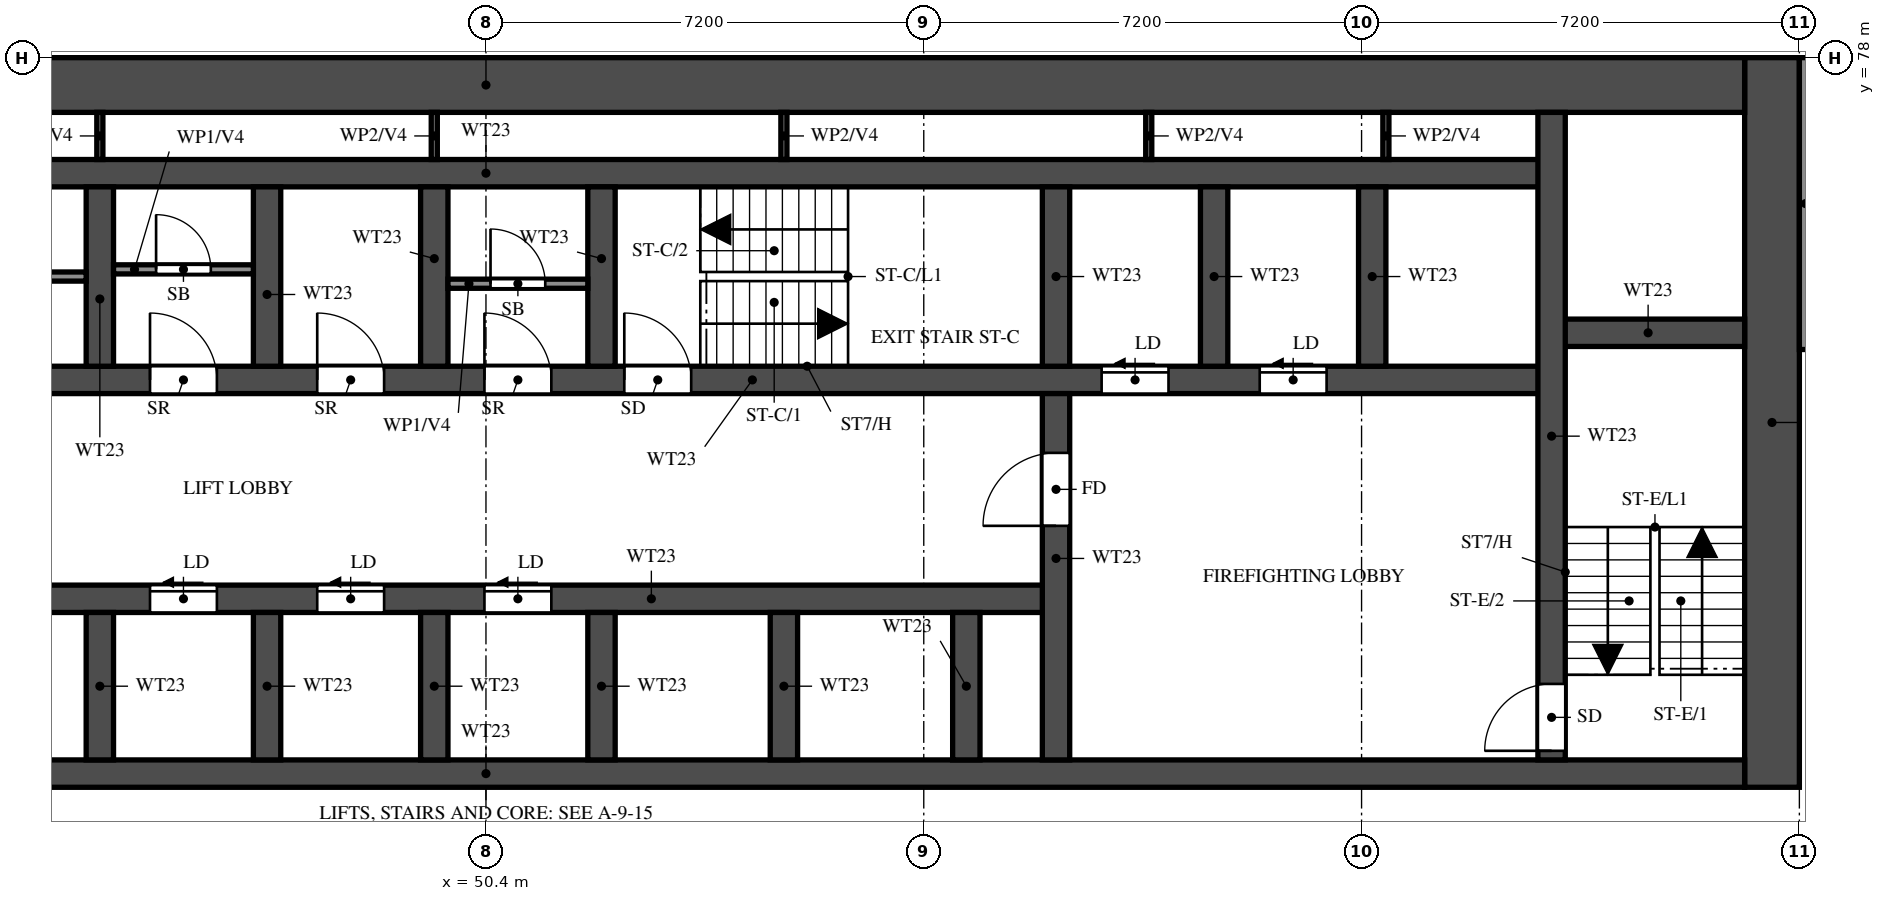
"""IFC4 building model, lengths in metres.
Left out: names, types, materials, properties, quantities, classifications, styles, units other than length and angle.
Written with IfcOpenShell. Run it as: python <this file> out.ifc"""

import sys

from ifc_helpers import new_model, si_unit, direction, frame, frame_2d, origin, place, context, subcontext, project, spatial, rectangle, extrude, element, fill, save


model = new_model("IFC4")
c1 = context("Model", 3, precision=1e-05, world=origin(), true_north=direction((0.0, 1.0)))
c2 = subcontext(c1, "Body", "Model", "MODEL_VIEW")
j1 = project(units=[si_unit("LENGTHUNIT", "METRE"), si_unit("PLANEANGLEUNIT", "RADIAN")], contexts=[c1])
p1 = place(None, origin())
s1 = spatial("IfcSite", under=j1, at=p1, CompositionType="ELEMENT")
p2 = place(p1, origin())
s2 = spatial("IfcBuilding", under=s1, at=p2, CompositionType="ELEMENT")
p3 = place(p2, frame((0.0, 0.0, 104.0)))
s3 = spatial("IfcBuildingStorey", under=s2, at=p3, CompositionType="ELEMENT", Elevation=104.0)
p4 = place(p3, frame((71.55, 66.0, 0.0), z_axis=(0.0, 0.0, 1.0), x_axis=(0.0, 1.0, 0.0)))
e1 = element("IfcWall", 1, at=p4, inside=s3, PredefinedType="SHEAR", context=c2, shape_type="SweptSolid", body=[
    extrude(rectangle(XDim=12.0, YDim=0.9, at=frame_2d((6.0, 0.0))), origin(), (0.0, 0.0, 1.0), 3.1),
])
p5 = place(p3, frame((29.7, 77.55, 0.0), z_axis=(0.0, 0.0, 1.0), x_axis=(1.0, 0.0, 0.0)))
e2 = element("IfcWall", 2, at=p5, inside=s3, PredefinedType="SHEAR", context=c2, shape_type="SweptSolid", body=[
    extrude(rectangle(XDim=41.4, YDim=0.9, at=frame_2d((20.7, 0.0))), origin(), (0.0, 0.0, 1.0), 3.1),
])
p6 = place(p3, frame((29.7, 66.225, 0.0), z_axis=(0.0, 0.0, 1.0), x_axis=(1.0, 0.0, 0.0)))
e3 = element("IfcWall", 3, at=p6, inside=s3, PredefinedType="SHEAR", context=c2, shape_type="SweptSolid", body=[
    extrude(rectangle(XDim=41.4, YDim=0.45, at=frame_2d((20.7, 0.0))), origin(), (0.0, 0.0, 1.0), 3.1),
])
p7 = place(p6, frame((0.925, 0.0, 0.0)))
e4 = element("IfcOpeningElement", 4, at=p7, cuts=e3, PredefinedType="OPENING", context=c2, shape_type="SweptSolid", body=[
    extrude(rectangle(XDim=1.1, YDim=2.1, at=frame_2d((0.55, 1.05))), frame((0.0, 0.235, 0.0), z_axis=(0.0, -1.0, 0.0), x_axis=(1.0, 0.0, 0.0)), (0.0, 0.0, 1.0), 0.47),
])
p8 = place(p6, frame((3.738, 0.0, 0.0)))
e5 = element("IfcOpeningElement", 5, at=p8, cuts=e3, PredefinedType="OPENING", context=c2, shape_type="SweptSolid", body=[
    extrude(rectangle(XDim=1.8, YDim=2.1, at=frame_2d((0.9, 1.05))), frame((0.0, 0.235, 0.0), z_axis=(0.0, -1.0, 0.0), x_axis=(1.0, 0.0, 0.0)), (0.0, 0.0, 1.0), 0.47),
])
p9 = place(p3, frame((35.575, 69.1, 0.0), z_axis=(0.0, 0.0, 1.0), x_axis=(1.0, 0.0, 0.0)))
e6 = element("IfcWall", 6, at=p9, inside=s3, PredefinedType="SHEAR", context=c2, shape_type="SweptSolid", body=[
    extrude(rectangle(XDim=24.2, YDim=0.45, at=frame_2d((12.1, 0.0))), origin(), (0.0, 0.0, 1.0), 3.1),
])
p10 = place(p9, frame((1.05, 0.0, 0.0)))
e7 = element("IfcOpeningElement", 7, at=p10, cuts=e6, PredefinedType="OPENING", context=c2, shape_type="SweptSolid", body=[
    extrude(rectangle(XDim=1.1, YDim=2.1, at=frame_2d((0.55, 1.05))), frame((0.0, 0.235, 0.0), z_axis=(0.0, -1.0, 0.0), x_axis=(1.0, 0.0, 0.0)), (0.0, 0.0, 1.0), 0.47),
])
p11 = place(p9, frame((3.8, 0.0, 0.0)))
e8 = element("IfcOpeningElement", 8, at=p11, cuts=e6, PredefinedType="OPENING", context=c2, shape_type="SweptSolid", body=[
    extrude(rectangle(XDim=1.1, YDim=2.1, at=frame_2d((0.55, 1.05))), frame((0.0, 0.235, 0.0), z_axis=(0.0, -1.0, 0.0), x_axis=(1.0, 0.0, 0.0)), (0.0, 0.0, 1.0), 0.47),
])
p12 = place(p9, frame((6.55, 0.0, 0.0)))
e9 = element("IfcOpeningElement", 9, at=p12, cuts=e6, PredefinedType="OPENING", context=c2, shape_type="SweptSolid", body=[
    extrude(rectangle(XDim=1.1, YDim=2.1, at=frame_2d((0.55, 1.05))), frame((0.0, 0.235, 0.0), z_axis=(0.0, -1.0, 0.0), x_axis=(1.0, 0.0, 0.0)), (0.0, 0.0, 1.0), 0.47),
])
p13 = place(p9, frame((9.3, 0.0, 0.0)))
e10 = element("IfcOpeningElement", 10, at=p13, cuts=e6, PredefinedType="OPENING", context=c2, shape_type="SweptSolid", body=[
    extrude(rectangle(XDim=1.1, YDim=2.1, at=frame_2d((0.55, 1.05))), frame((0.0, 0.235, 0.0), z_axis=(0.0, -1.0, 0.0), x_axis=(1.0, 0.0, 0.0)), (0.0, 0.0, 1.0), 0.47),
])
p14 = place(p9, frame((12.05, 0.0, 0.0)))
e11 = element("IfcOpeningElement", 11, at=p14, cuts=e6, PredefinedType="OPENING", context=c2, shape_type="SweptSolid", body=[
    extrude(rectangle(XDim=1.1, YDim=2.1, at=frame_2d((0.55, 1.05))), frame((0.0, 0.235, 0.0), z_axis=(0.0, -1.0, 0.0), x_axis=(1.0, 0.0, 0.0)), (0.0, 0.0, 1.0), 0.47),
])
p15 = place(p9, frame((14.8, 0.0, 0.0)))
e12 = element("IfcOpeningElement", 12, at=p15, cuts=e6, PredefinedType="OPENING", context=c2, shape_type="SweptSolid", body=[
    extrude(rectangle(XDim=1.1, YDim=2.1, at=frame_2d((0.55, 1.05))), frame((0.0, 0.235, 0.0), z_axis=(0.0, -1.0, 0.0), x_axis=(1.0, 0.0, 0.0)), (0.0, 0.0, 1.0), 0.47),
])
p16 = place(p3, frame((32.875, 72.7, 0.0), z_axis=(0.0, 0.0, 1.0), x_axis=(1.0, 0.0, 0.0)))
e13 = element("IfcWall", 13, at=p16, inside=s3, PredefinedType="SHEAR", context=c2, shape_type="SweptSolid", body=[
    extrude(rectangle(XDim=35.05, YDim=0.45, at=frame_2d((17.525, 0.0))), origin(), (0.0, 0.0, 1.0), 3.1),
])
p17 = place(p16, frame((19.8, 0.0, 0.0)))
e14 = element("IfcOpeningElement", 14, at=p17, cuts=e13, PredefinedType="OPENING", context=c2, shape_type="SweptSolid", body=[
    extrude(rectangle(XDim=1.1, YDim=2.1, at=frame_2d((0.55, 1.05))), frame((0.0, 0.235, 0.0), z_axis=(0.0, -1.0, 0.0), x_axis=(1.0, 0.0, 0.0)), (0.0, 0.0, 1.0), 0.47),
])
p18 = place(p16, frame((27.65, 0.0, 0.0)))
e15 = element("IfcOpeningElement", 15, at=p18, cuts=e13, PredefinedType="OPENING", context=c2, shape_type="SweptSolid", body=[
    extrude(rectangle(XDim=1.1, YDim=2.1, at=frame_2d((0.55, 1.05))), frame((0.0, 0.235, 0.0), z_axis=(0.0, -1.0, 0.0), x_axis=(1.0, 0.0, 0.0)), (0.0, 0.0, 1.0), 0.47),
])
p19 = place(p16, frame((30.25, 0.0, 0.0)))
e16 = element("IfcOpeningElement", 16, at=p19, cuts=e13, PredefinedType="OPENING", context=c2, shape_type="SweptSolid", body=[
    extrude(rectangle(XDim=1.1, YDim=2.1, at=frame_2d((0.55, 1.05))), frame((0.0, 0.235, 0.0), z_axis=(0.0, -1.0, 0.0), x_axis=(1.0, 0.0, 0.0)), (0.0, 0.0, 1.0), 0.47),
])
p20 = place(p16, frame((3.75, 0.0, 0.0)))
e17 = element("IfcOpeningElement", 17, at=p20, cuts=e13, PredefinedType="OPENING", context=c2, shape_type="SweptSolid", body=[
    extrude(rectangle(XDim=1.1, YDim=2.1, at=frame_2d((0.55, 1.05))), frame((0.0, 0.235, 0.0), z_axis=(0.0, -1.0, 0.0), x_axis=(1.0, 0.0, 0.0)), (0.0, 0.0, 1.0), 0.47),
])
p21 = place(p16, frame((6.5, 0.0, 0.0)))
e18 = element("IfcOpeningElement", 18, at=p21, cuts=e13, PredefinedType="OPENING", context=c2, shape_type="SweptSolid", body=[
    extrude(rectangle(XDim=1.1, YDim=2.1, at=frame_2d((0.55, 1.05))), frame((0.0, 0.235, 0.0), z_axis=(0.0, -1.0, 0.0), x_axis=(1.0, 0.0, 0.0)), (0.0, 0.0, 1.0), 0.47),
])
p22 = place(p16, frame((9.25, 0.0, 0.0)))
e19 = element("IfcOpeningElement", 19, at=p22, cuts=e13, PredefinedType="OPENING", context=c2, shape_type="SweptSolid", body=[
    extrude(rectangle(XDim=1.1, YDim=2.1, at=frame_2d((0.55, 1.05))), frame((0.0, 0.235, 0.0), z_axis=(0.0, -1.0, 0.0), x_axis=(1.0, 0.0, 0.0)), (0.0, 0.0, 1.0), 0.47),
])
p23 = place(p16, frame((12.0, 0.0, 0.0)))
e20 = element("IfcOpeningElement", 20, at=p23, cuts=e13, PredefinedType="OPENING", context=c2, shape_type="SweptSolid", body=[
    extrude(rectangle(XDim=1.1, YDim=2.1, at=frame_2d((0.55, 1.05))), frame((0.0, 0.235, 0.0), z_axis=(0.0, -1.0, 0.0), x_axis=(1.0, 0.0, 0.0)), (0.0, 0.0, 1.0), 0.47),
])
p24 = place(p16, frame((14.75, 0.0, 0.0)))
e21 = element("IfcOpeningElement", 21, at=p24, cuts=e13, PredefinedType="OPENING", context=c2, shape_type="SweptSolid", body=[
    extrude(rectangle(XDim=1.1, YDim=2.1, at=frame_2d((0.55, 1.05))), frame((0.0, 0.235, 0.0), z_axis=(0.0, -1.0, 0.0), x_axis=(1.0, 0.0, 0.0)), (0.0, 0.0, 1.0), 0.47),
])
p25 = place(p16, frame((17.5, 0.0, 0.0)))
e22 = element("IfcOpeningElement", 22, at=p25, cuts=e13, PredefinedType="OPENING", context=c2, shape_type="SweptSolid", body=[
    extrude(rectangle(XDim=1.1, YDim=2.1, at=frame_2d((0.55, 1.05))), frame((0.0, 0.235, 0.0), z_axis=(0.0, -1.0, 0.0), x_axis=(1.0, 0.0, 0.0)), (0.0, 0.0, 1.0), 0.47),
])
p26 = place(p16, frame((0.913, 0.0, 0.0)))
e23 = element("IfcOpeningElement", 23, at=p26, cuts=e13, PredefinedType="OPENING", context=c2, shape_type="SweptSolid", body=[
    extrude(rectangle(XDim=1.1, YDim=2.1, at=frame_2d((0.55, 1.05))), frame((0.0, 0.235, 0.0), z_axis=(0.0, -1.0, 0.0), x_axis=(1.0, 0.0, 0.0)), (0.0, 0.0, 1.0), 0.47),
])
p27 = place(p3, frame((32.875, 76.1, 0.0), z_axis=(0.0, 0.0, 1.0), x_axis=(1.0, 0.0, 0.0)))
e24 = element("IfcWall", 24, at=p27, inside=s3, PredefinedType="SHEAR", context=c2, shape_type="SweptSolid", body=[
    extrude(rectangle(XDim=35.05, YDim=0.45, at=frame_2d((17.525, 0.0))), origin(), (0.0, 0.0, 1.0), 3.1),
])
p28 = place(p3, frame((67.925, 73.475, 0.0), z_axis=(0.0, 0.0, 1.0), x_axis=(1.0, 0.0, 0.0)))
e25 = element("IfcWall", 25, at=p28, inside=s3, PredefinedType="SHEAR", context=c2, shape_type="SweptSolid", body=[
    extrude(rectangle(XDim=3.175, YDim=0.45, at=frame_2d((1.587, 0.0))), origin(), (0.0, 0.0, 1.0), 3.1),
])
p29 = place(p3, frame((67.925, 66.45, 0.0), z_axis=(0.0, 0.0, 1.0), x_axis=(0.0, 1.0, 0.0)))
e26 = element("IfcWall", 26, at=p29, inside=s3, PredefinedType="SHEAR", context=c2, shape_type="SweptSolid", body=[
    extrude(rectangle(XDim=10.65, YDim=0.45, at=frame_2d((5.325, 0.0))), origin(), (0.0, 0.0, 1.0), 3.1),
])
p30 = place(p29, frame((0.15, 0.0, 0.0)))
e27 = element("IfcOpeningElement", 27, at=p30, cuts=e26, PredefinedType="OPENING", context=c2, shape_type="SweptSolid", body=[
    extrude(rectangle(XDim=1.1, YDim=2.1, at=frame_2d((0.55, 1.05))), frame((0.0, 0.235, 0.0), z_axis=(0.0, -1.0, 0.0), x_axis=(1.0, 0.0, 0.0)), (0.0, 0.0, 1.0), 0.47),
])
p31 = place(p3, frame((59.775, 66.45, 0.0), z_axis=(0.0, 0.0, 1.0), x_axis=(0.0, 1.0, 0.0)))
e28 = element("IfcWall", 28, at=p31, inside=s3, PredefinedType="SHEAR", context=c2, shape_type="SweptSolid", body=[
    extrude(rectangle(XDim=6.025, YDim=0.45, at=frame_2d((3.013, 0.0))), origin(), (0.0, 0.0, 1.0), 3.1),
])
p32 = place(p31, frame((3.85, 0.0, 0.0)))
e29 = element("IfcOpeningElement", 29, at=p32, cuts=e28, PredefinedType="OPENING", context=c2, shape_type="SweptSolid", body=[
    extrude(rectangle(XDim=1.2, YDim=2.1, at=frame_2d((0.6, 1.05))), frame((0.0, 0.235, 0.0), z_axis=(0.0, -1.0, 0.0), x_axis=(1.0, 0.0, 0.0)), (0.0, 0.0, 1.0), 0.47),
])
p33 = place(p3, frame((59.775, 72.925, 0.0), z_axis=(0.0, 0.0, 1.0), x_axis=(0.0, 1.0, 0.0)))
e30 = element("IfcWall", 30, at=p33, inside=s3, PredefinedType="SHEAR", context=c2, shape_type="SweptSolid", body=[
    extrude(rectangle(XDim=2.95, YDim=0.45, at=frame_2d((1.475, 0.0))), origin(), (0.0, 0.0, 1.0), 3.1),
])
for number, where, z_axis, x_axis in (
    (31, (44.05, 66.45, 0.0), (0.0, 0.0, 1.0), (0.0, 1.0, 0.0)),
    (32, (46.8, 66.45, 0.0), (0.0, 0.0, 1.0), (0.0, 1.0, 0.0)),
    (33, (49.55, 66.45, 0.0), (0.0, 0.0, 1.0), (0.0, 1.0, 0.0)),
    (34, (52.3, 66.45, 0.0), (0.0, 0.0, 1.0), (0.0, 1.0, 0.0)),
    (35, (55.3, 66.45, 0.0), (0.0, 0.0, 1.0), (0.0, 1.0, 0.0)),
    (36, (58.3, 66.45, 0.0), (0.0, 0.0, 1.0), (0.0, 1.0, 0.0)),
):
    element("IfcWall", number, at=place(p3, frame(where, z_axis=z_axis, x_axis=x_axis)), inside=s3, PredefinedType="SHEAR", context=c2, shape_type="SweptSolid", body=[
        extrude(rectangle(XDim=2.425, YDim=0.45, at=frame_2d((1.212, 0.0))), origin(), (0.0, 0.0, 1.0), 3.1),
    ])
for number, where, z_axis, x_axis in (
    (37, (44.05, 72.925, 0.0), (0.0, 0.0, 1.0), (0.0, 1.0, 0.0)),
    (38, (46.8, 72.925, 0.0), (0.0, 0.0, 1.0), (0.0, 1.0, 0.0)),
    (39, (49.55, 72.925, 0.0), (0.0, 0.0, 1.0), (0.0, 1.0, 0.0)),
    (40, (52.3, 72.925, 0.0), (0.0, 0.0, 1.0), (0.0, 1.0, 0.0)),
    (41, (62.375, 72.925, 0.0), (0.0, 0.0, 1.0), (0.0, 1.0, 0.0)),
    (42, (64.975, 72.925, 0.0), (0.0, 0.0, 1.0), (0.0, 1.0, 0.0)),
):
    element("IfcWall", number, at=place(p3, frame(where, z_axis=z_axis, x_axis=x_axis)), inside=s3, PredefinedType="SHEAR", context=c2, shape_type="SweptSolid", body=[
        extrude(rectangle(XDim=2.95, YDim=0.45, at=frame_2d((1.475, 0.0))), origin(), (0.0, 0.0, 1.0), 3.1),
    ])
p34 = place(p3, frame((41.525, 74.4, 0.0), z_axis=(0.0, 0.0, 1.0), x_axis=(1.0, 0.0, 0.0)))
e43 = element("IfcWall", 43, at=p34, inside=s3, PredefinedType="PARTITIONING", context=c2, shape_type="SweptSolid", body=[
    extrude(rectangle(XDim=2.3, YDim=0.15, at=frame_2d((1.15, 0.0))), origin(), (0.0, 0.0, 1.0), 3.1),
])
p35 = place(p34, frame((0.7, 0.0, 0.0)))
e44 = element("IfcOpeningElement", 44, at=p35, cuts=e43, PredefinedType="OPENING", context=c2, shape_type="SweptSolid", body=[
    extrude(rectangle(XDim=0.9, YDim=2.1, at=frame_2d((0.45, 1.05))), frame((0.0, 0.085, 0.0), z_axis=(0.0, -1.0, 0.0), x_axis=(1.0, 0.0, 0.0)), (0.0, 0.0, 1.0), 0.17),
])
p36 = place(p3, frame((44.275, 74.518, 0.0), z_axis=(0.0, 0.0, 1.0), x_axis=(1.0, 0.0, 0.0)))
e45 = element("IfcWall", 45, at=p36, inside=s3, PredefinedType="PARTITIONING", context=c2, shape_type="SweptSolid", body=[
    extrude(rectangle(XDim=2.3, YDim=0.15, at=frame_2d((1.15, 0.0))), origin(), (0.0, 0.0, 1.0), 3.1),
])
p37 = place(p36, frame((0.7, 0.0, 0.0)))
e46 = element("IfcOpeningElement", 46, at=p37, cuts=e45, PredefinedType="OPENING", context=c2, shape_type="SweptSolid", body=[
    extrude(rectangle(XDim=0.9, YDim=2.1, at=frame_2d((0.45, 1.05))), frame((0.0, 0.085, 0.0), z_axis=(0.0, -1.0, 0.0), x_axis=(1.0, 0.0, 0.0)), (0.0, 0.0, 1.0), 0.17),
])
p38 = place(p3, frame((49.775, 74.282, 0.0), z_axis=(0.0, 0.0, 1.0), x_axis=(1.0, 0.0, 0.0)))
e47 = element("IfcWall", 47, at=p38, inside=s3, PredefinedType="PARTITIONING", context=c2, shape_type="SweptSolid", body=[
    extrude(rectangle(XDim=2.3, YDim=0.15, at=frame_2d((1.15, 0.0))), origin(), (0.0, 0.0, 1.0), 3.1),
])
p39 = place(p38, frame((0.7, 0.0, 0.0)))
e48 = element("IfcOpeningElement", 48, at=p39, cuts=e47, PredefinedType="OPENING", context=c2, shape_type="SweptSolid", body=[
    extrude(rectangle(XDim=0.9, YDim=2.1, at=frame_2d((0.45, 1.05))), frame((0.0, 0.085, 0.0), z_axis=(0.0, -1.0, 0.0), x_axis=(1.0, 0.0, 0.0)), (0.0, 0.0, 1.0), 0.17),
])
for number, where, z_axis, x_axis in (
    (49, (44.05, 76.325, 0.0), (0.0, 0.0, 1.0), (0.0, 1.0, 0.0)),
    (50, (49.55, 76.325, 0.0), (0.0, 0.0, 1.0), (0.0, 1.0, 0.0)),
    (51, (55.3, 76.325, 0.0), (0.0, 0.0, 1.0), (0.0, 1.0, 0.0)),
    (52, (61.3, 76.325, 0.0), (0.0, 0.0, 1.0), (0.0, 1.0, 0.0)),
    (53, (65.2, 76.325, 0.0), (0.0, 0.0, 1.0), (0.0, 1.0, 0.0)),
):
    element("IfcWall", number, at=place(p3, frame(where, z_axis=z_axis, x_axis=x_axis)), inside=s3, PredefinedType="PARTITIONING", context=c2, shape_type="SweptSolid", body=[
        extrude(rectangle(XDim=0.775, YDim=0.1, at=frame_2d((0.388, 0.0))), origin(), (0.0, 0.0, 1.0), 3.1),
    ])
p40 = place(p3, frame((72.1, 73.2, 0.0), z_axis=(0.0, 0.0, 1.0), x_axis=(0.0, 1.0, 0.0)))
e54 = element("IfcWall", 54, at=p40, inside=s3, PredefinedType="SOLIDWALL", context=c2, shape_type="SweptSolid", body=[
    extrude(rectangle(XDim=4.8, YDim=0.2, at=frame_2d((2.4, 0.0))), origin(), (0.0, 0.0, 1.0), 3.1),
])
p41 = place(p17, origin())
e55 = element("IfcDoor", 55, at=p41, inside=s3, OperationType="SINGLE_SWING_LEFT", PredefinedType="DOOR", context=c2, shape_type="SweptSolid", body=[
    extrude(rectangle(XDim=1.1, YDim=2.1, at=frame_2d((0.55, 1.05))), frame((0.0, 0.025, 0.0), z_axis=(0.0, -1.0, 0.0), x_axis=(1.0, 0.0, 0.0)), (0.0, 0.0, 1.0), 0.05),
])
fill(e14, e55)
p42 = place(p30, origin())
e56 = element("IfcDoor", 56, at=p42, inside=s3, OperationType="SINGLE_SWING_LEFT", PredefinedType="DOOR", context=c2, shape_type="SweptSolid", body=[
    extrude(rectangle(XDim=1.1, YDim=2.1, at=frame_2d((0.55, 1.05))), frame((0.0, 0.025, 0.0), z_axis=(0.0, -1.0, 0.0), x_axis=(1.0, 0.0, 0.0)), (0.0, 0.0, 1.0), 0.05),
])
fill(e27, e56)
p43 = place(p32, origin())
e57 = element("IfcDoor", 57, at=p43, inside=s3, OperationType="SINGLE_SWING_RIGHT", PredefinedType="DOOR", context=c2, shape_type="SweptSolid", body=[
    extrude(rectangle(XDim=1.2, YDim=2.1, at=frame_2d((0.6, 1.05))), frame((0.0, 0.025, 0.0), z_axis=(0.0, -1.0, 0.0), x_axis=(1.0, 0.0, 0.0)), (0.0, 0.0, 1.0), 0.05),
])
fill(e29, e57)
p44 = place(p18, origin())
e58 = element("IfcDoor", 58, at=p44, inside=s3, OperationType="SLIDING_TO_LEFT", PredefinedType="DOOR", context=c2, shape_type="SweptSolid", body=[
    extrude(rectangle(XDim=1.1, YDim=2.1, at=frame_2d((0.55, 1.05))), frame((0.0, 0.025, 0.0), z_axis=(0.0, -1.0, 0.0), x_axis=(1.0, 0.0, 0.0)), (0.0, 0.0, 1.0), 0.05),
])
fill(e15, e58)
p45 = place(p19, origin())
e59 = element("IfcDoor", 59, at=p45, inside=s3, OperationType="SLIDING_TO_LEFT", PredefinedType="DOOR", context=c2, shape_type="SweptSolid", body=[
    extrude(rectangle(XDim=1.1, YDim=2.1, at=frame_2d((0.55, 1.05))), frame((0.0, 0.025, 0.0), z_axis=(0.0, -1.0, 0.0), x_axis=(1.0, 0.0, 0.0)), (0.0, 0.0, 1.0), 0.05),
])
fill(e16, e59)
p46 = place(p13, origin())
e60 = element("IfcDoor", 60, at=p46, inside=s3, OperationType="SLIDING_TO_LEFT", PredefinedType="DOOR", context=c2, shape_type="SweptSolid", body=[
    extrude(rectangle(XDim=1.1, YDim=2.1, at=frame_2d((0.55, 1.05))), frame((0.0, 0.025, 0.0), z_axis=(0.0, -1.0, 0.0), x_axis=(1.0, 0.0, 0.0)), (0.0, 0.0, 1.0), 0.05),
])
fill(e10, e60)
p47 = place(p14, origin())
e61 = element("IfcDoor", 61, at=p47, inside=s3, OperationType="SLIDING_TO_LEFT", PredefinedType="DOOR", context=c2, shape_type="SweptSolid", body=[
    extrude(rectangle(XDim=1.1, YDim=2.1, at=frame_2d((0.55, 1.05))), frame((0.0, 0.025, 0.0), z_axis=(0.0, -1.0, 0.0), x_axis=(1.0, 0.0, 0.0)), (0.0, 0.0, 1.0), 0.05),
])
fill(e11, e61)
p48 = place(p15, origin())
e62 = element("IfcDoor", 62, at=p48, inside=s3, OperationType="SLIDING_TO_LEFT", PredefinedType="DOOR", context=c2, shape_type="SweptSolid", body=[
    extrude(rectangle(XDim=1.1, YDim=2.1, at=frame_2d((0.55, 1.05))), frame((0.0, 0.025, 0.0), z_axis=(0.0, -1.0, 0.0), x_axis=(1.0, 0.0, 0.0)), (0.0, 0.0, 1.0), 0.05),
])
fill(e12, e62)
p49 = place(p23, origin())
e63 = element("IfcDoor", 63, at=p49, inside=s3, OperationType="SINGLE_SWING_LEFT", PredefinedType="DOOR", context=c2, shape_type="SweptSolid", body=[
    extrude(rectangle(XDim=1.1, YDim=2.1, at=frame_2d((0.55, 1.05))), frame((0.0, 0.025, 0.0), z_axis=(0.0, -1.0, 0.0), x_axis=(1.0, 0.0, 0.0)), (0.0, 0.0, 1.0), 0.05),
])
fill(e20, e63)
p50 = place(p37, origin())
e64 = element("IfcDoor", 64, at=p50, inside=s3, OperationType="SINGLE_SWING_LEFT", PredefinedType="DOOR", context=c2, shape_type="SweptSolid", body=[
    extrude(rectangle(XDim=0.9, YDim=2.1, at=frame_2d((0.45, 1.05))), frame((0.0, 0.025, 0.0), z_axis=(0.0, -1.0, 0.0), x_axis=(1.0, 0.0, 0.0)), (0.0, 0.0, 1.0), 0.05),
])
fill(e46, e64)
p51 = place(p24, origin())
e65 = element("IfcDoor", 65, at=p51, inside=s3, OperationType="SINGLE_SWING_LEFT", PredefinedType="DOOR", context=c2, shape_type="SweptSolid", body=[
    extrude(rectangle(XDim=1.1, YDim=2.1, at=frame_2d((0.55, 1.05))), frame((0.0, 0.025, 0.0), z_axis=(0.0, -1.0, 0.0), x_axis=(1.0, 0.0, 0.0)), (0.0, 0.0, 1.0), 0.05),
])
fill(e21, e65)
p52 = place(p25, origin())
e66 = element("IfcDoor", 66, at=p52, inside=s3, OperationType="SINGLE_SWING_LEFT", PredefinedType="DOOR", context=c2, shape_type="SweptSolid", body=[
    extrude(rectangle(XDim=1.1, YDim=2.1, at=frame_2d((0.55, 1.05))), frame((0.0, 0.025, 0.0), z_axis=(0.0, -1.0, 0.0), x_axis=(1.0, 0.0, 0.0)), (0.0, 0.0, 1.0), 0.05),
])
fill(e22, e66)
p53 = place(p39, origin())
e67 = element("IfcDoor", 67, at=p53, inside=s3, OperationType="SINGLE_SWING_RIGHT", PredefinedType="DOOR", context=c2, shape_type="SweptSolid", body=[
    extrude(rectangle(XDim=0.9, YDim=2.1, at=frame_2d((0.45, 1.05))), frame((0.0, 0.025, 0.0), z_axis=(0.0, -1.0, 0.0), x_axis=(1.0, 0.0, 0.0)), (0.0, 0.0, 1.0), 0.05),
])
fill(e48, e67)
save(model, sys.argv[1])
